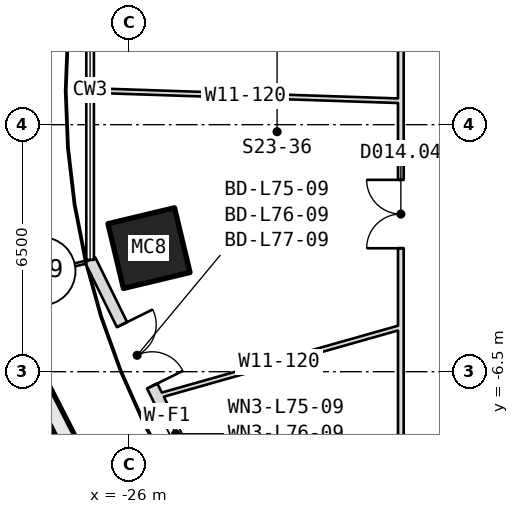
"""IFC4 building model, lengths in metres.
Left out: names, types, materials, properties, quantities, classifications, styles, units other than length and angle.
Written with IfcOpenShell. Run it as: python <this file> out.ifc"""

import sys

from ifc_helpers import new_model, si_unit, direction, frame, frame_2d, origin, origin_2d, place, context, subcontext, project, spatial, rectangle, hollow_rectangle, extrude, element, fill, save


model = new_model("IFC4")
c1 = context("Model", 3, precision=1e-05, world=origin(), true_north=direction((0.0, 1.0)))
c2 = subcontext(c1, "Body", "Model", "MODEL_VIEW")
j1 = project(units=[si_unit("LENGTHUNIT", "METRE"), si_unit("PLANEANGLEUNIT", "RADIAN")], contexts=[c1])
p1 = place(None, origin())
s1 = spatial("IfcSite", under=j1, at=p1, CompositionType="ELEMENT")
p2 = place(p1, origin())
s2 = spatial("IfcBuilding", under=s1, at=p2, CompositionType="ELEMENT")
p3 = place(p2, frame((0.0, 0.0, 334.3)))
s3 = spatial("IfcBuildingStorey", under=s2, at=p3, CompositionType="ELEMENT", Elevation=334.3)
p4 = place(p3, frame((-25.478, -3.248, -0.18), z_axis=(0.0, 0.0, 1.0), x_axis=(-0.232642553419, 0.97256230769, 0.0)))
e1 = element("IfcColumn", 1, at=p4, inside=s3, PredefinedType="COLUMN", context=c2, shape_type="SweptSolid", body=[
    extrude(hollow_rectangle(XDim=1.75, YDim=1.8, WallThickness=0.055, at=origin_2d()), origin(), (0.0, 0.0, 1.0), 4.15),
])
p5 = place(p3, frame((-27.027, -3.556, 0.0), z_axis=(0.0, 0.0, 1.0), x_axis=(0.441693248755, -0.897166135119, 0.0)))
e2 = element("IfcWall", 2, at=p5, inside=s3, PredefinedType="SOLIDWALL", context=c2, shape_type="SweptSolid", body=[
    extrude(rectangle(XDim=9.178, YDim=0.3, at=frame_2d((4.589, 0.0))), origin(), (0.0, 0.0, 1.0), 3.97),
])
p6 = place(p5, frame((1.9, 0.0, 0.0)))
e3 = element("IfcOpeningElement", 3, at=p6, cuts=e2, PredefinedType="OPENING", context=c2, shape_type="SweptSolid", body=[
    extrude(rectangle(XDim=1.8, YDim=2.4, at=frame_2d((0.9, 1.2))), frame((0.0, 0.16, 0.0), z_axis=(0.0, -1.0, 0.0), x_axis=(1.0, 0.0, 0.0)), (0.0, 0.0, 1.0), 0.32),
])
p7 = place(p5, frame((4.3, 0.0, 0.9)))
e4 = element("IfcOpeningElement", 4, at=p7, cuts=e2, PredefinedType="OPENING", context=c2, shape_type="SweptSolid", body=[
    extrude(rectangle(XDim=1.6, YDim=1.5, at=frame_2d((0.8, 0.75))), frame((0.0, 0.16, 0.0), z_axis=(0.0, -1.0, 0.0), x_axis=(1.0, 0.0, 0.0)), (0.0, 0.0, 1.0), 0.32),
])
p8 = place(p3, frame((-18.85, -11.18, 0.0), z_axis=(0.0, 0.0, 1.0), x_axis=(0.0, 1.0, 0.0)))
e5 = element("IfcWall", 5, at=p8, inside=s3, PredefinedType="PARTITIONING", context=c2, shape_type="SweptSolid", body=[
    extrude(rectangle(XDim=22.361, YDim=0.15, at=frame_2d((11.18, 0.0))), origin(), (0.0, 0.0, 1.0), 3.97),
])
p9 = place(p8, frame((16.962, 0.0, 0.0)))
e6 = element("IfcOpeningElement", 6, at=p9, cuts=e5, PredefinedType="OPENING", context=c2, shape_type="SweptSolid", body=[
    extrude(rectangle(XDim=0.95, YDim=2.1, at=frame_2d((0.475, 1.05))), frame((0.0, 0.085, 0.0), z_axis=(0.0, -1.0, 0.0), x_axis=(1.0, 0.0, 0.0)), (0.0, 0.0, 1.0), 0.17),
])
p10 = place(p8, frame((13.466, 0.0, 0.0)))
e7 = element("IfcOpeningElement", 7, at=p10, cuts=e5, PredefinedType="OPENING", context=c2, shape_type="SweptSolid", body=[
    extrude(rectangle(XDim=0.95, YDim=2.1, at=frame_2d((0.475, 1.05))), frame((0.0, 0.085, 0.0), z_axis=(0.0, -1.0, 0.0), x_axis=(1.0, 0.0, 0.0)), (0.0, 0.0, 1.0), 0.17),
])
p11 = place(p8, frame((7.929, 0.0, 0.0)))
e8 = element("IfcOpeningElement", 8, at=p11, cuts=e5, PredefinedType="OPENING", context=c2, shape_type="SweptSolid", body=[
    extrude(rectangle(XDim=1.8, YDim=2.1, at=frame_2d((0.9, 1.05))), frame((0.0, 0.085, 0.0), z_axis=(0.0, -1.0, 0.0), x_axis=(1.0, 0.0, 0.0)), (0.0, 0.0, 1.0), 0.17),
])
p12 = place(p3, frame((-18.85, -5.332, 0.0), z_axis=(0.0, 0.0, 1.0), x_axis=(-0.962246620086, -0.272179062626, 0.0)))
e9 = element("IfcWall", 9, at=p12, inside=s3, PredefinedType="PARTITIONING", context=c2, shape_type="SweptSolid", body=[
    extrude(rectangle(XDim=6.662, YDim=0.12, at=frame_2d((3.331, 0.0))), origin(), (0.0, 0.0, 1.0), 3.97),
])
p13 = place(p3, frame((-18.85, 0.628, 0.0), z_axis=(0.0, 0.0, 1.0), x_axis=(-0.999446363227, 0.03327111408, 0.0)))
e10 = element("IfcWall", 10, at=p13, inside=s3, PredefinedType="PARTITIONING", context=c2, shape_type="SweptSolid", body=[
    extrude(rectangle(XDim=8.182, YDim=0.12, at=frame_2d((4.091, 0.0))), origin(), (0.0, 0.0, 1.0), 3.97),
])
p14 = place(p6, origin())
e11 = element("IfcDoor", 11, at=p14, inside=s3, OperationType="SINGLE_SWING_LEFT", PredefinedType="DOOR", context=c2, shape_type="SweptSolid", body=[
    extrude(rectangle(XDim=1.8, YDim=2.4, at=frame_2d((0.9, 1.2))), frame((0.0, 0.025, 0.0), z_axis=(0.0, -1.0, 0.0), x_axis=(1.0, 0.0, 0.0)), (0.0, 0.0, 1.0), 0.05),
])
fill(e3, e11)
p15 = place(p7, origin())
e12 = element("IfcWindow", 12, at=p15, inside=s3, PartitioningType="SINGLE_PANEL", PredefinedType="WINDOW", context=c2, shape_type="SweptSolid", body=[
    extrude(rectangle(XDim=1.6, YDim=1.5, at=frame_2d((0.8, 0.75))), frame((0.0, 0.03, 0.0), z_axis=(0.0, -1.0, 0.0), x_axis=(1.0, 0.0, 0.0)), (0.0, 0.0, 1.0), 0.06),
])
fill(e4, e12)
p16 = place(p11, origin())
e13 = element("IfcDoor", 13, at=p16, inside=s3, OperationType="DOUBLE_DOOR_SINGLE_SWING", PredefinedType="DOOR", context=c2, shape_type="SweptSolid", body=[
    extrude(rectangle(XDim=1.8, YDim=2.1, at=frame_2d((0.9, 1.05))), frame((0.0, 0.025, 0.0), z_axis=(0.0, -1.0, 0.0), x_axis=(1.0, 0.0, 0.0)), (0.0, 0.0, 1.0), 0.05),
])
fill(e8, e13)
save(model, sys.argv[1])
